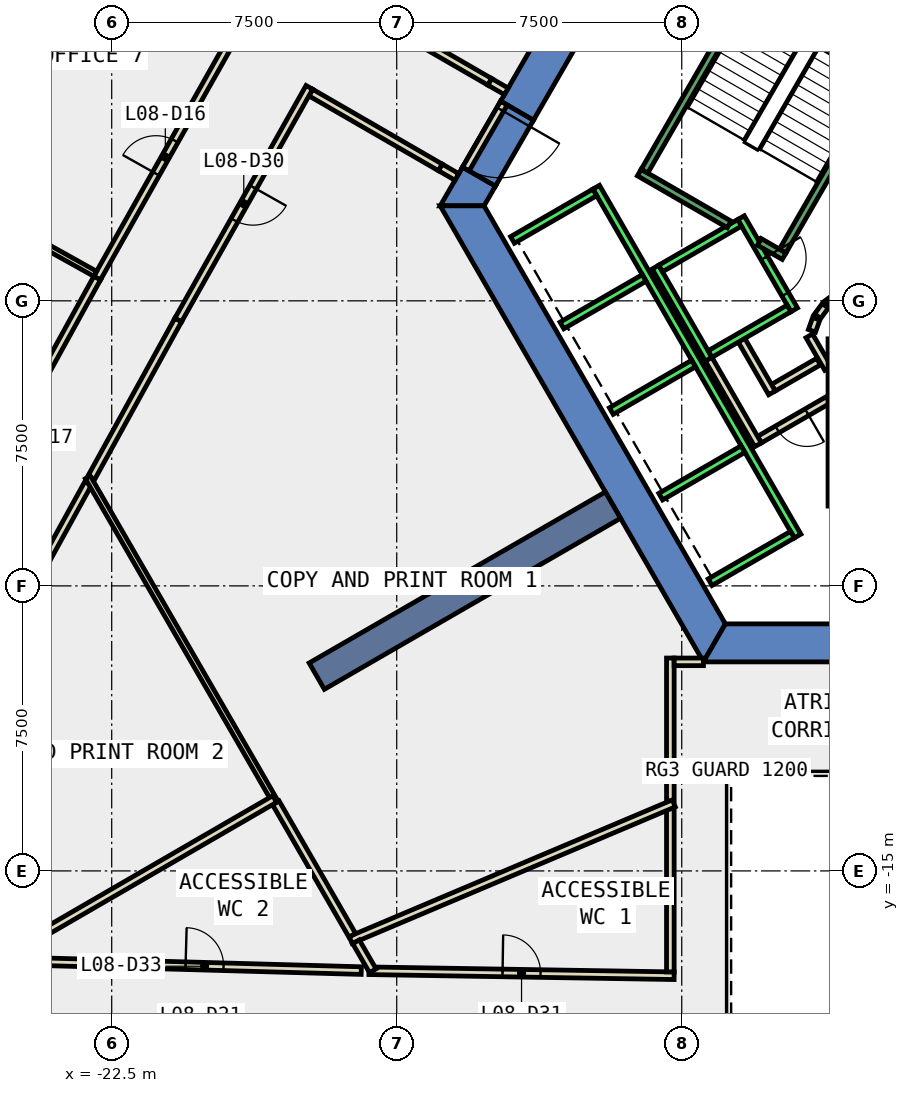
"""IFC4 building model, lengths in metres.
Left out: names, types, materials, properties, quantities, classifications, styles, units other than length and angle.
Written with IfcOpenShell. Run it as: python <this file> out.ifc"""

import sys

from ifc_helpers import new_model, si_unit, direction, frame, frame_2d, origin, place, context, subcontext, project, spatial, polyline, rectangle, outline, extrude, element, fill, save


model = new_model("IFC4")
c1 = context("Model", 3, precision=1e-05, world=origin(), true_north=direction((0.0, 1.0)))
c2 = subcontext(c1, "Body", "Model", "MODEL_VIEW")
j1 = project(units=[si_unit("LENGTHUNIT", "METRE"), si_unit("PLANEANGLEUNIT", "RADIAN")], contexts=[c1])
p1 = place(None, origin())
s1 = spatial("IfcSite", under=j1, at=p1, CompositionType="ELEMENT")
p2 = place(p1, origin())
s2 = spatial("IfcBuilding", under=s1, at=p2, CompositionType="ELEMENT")
p3 = place(p2, frame((0.0, 0.0, 43.4)))
s3 = spatial("IfcBuildingStorey", under=s2, at=p3, CompositionType="ELEMENT", Elevation=43.4)
p4 = place(p3, frame((0.0, 0.0, -0.4)))
e1 = element("IfcWall", 1, at=p4, inside=s3, PredefinedType="SHEAR", context=c2, shape_type="SweptSolid", body=[
    extrude(outline(polyline([(-12.267, 5.252), (-11.402, 4.752), (-6.351, 13.5), (-6.928, 14.5), (-12.267, 5.252)])), origin(), (0.0, 0.0, 1.0), 4.2),
])
p5 = place(p3, frame((0.0, 0.0, -0.4)))
e2 = element("IfcWall", 2, at=p5, inside=s3, PredefinedType="SHEAR", context=c2, shape_type="SweptSolid", body=[
    extrude(outline(polyline([(-12.402, 3.02), (-13.267, 3.52), (-13.856, 2.5), (-12.702, 2.5), (-12.402, 3.02)])), origin(), (0.0, 0.0, 1.0), 4.2),
])
p6 = place(p3, frame((0.0, 0.0, 3.6)))
e3 = element("IfcWall", 3, at=p6, inside=s3, PredefinedType="SHEAR", context=c2, shape_type="SweptSolid", body=[
    extrude(outline(polyline([(-13.267, 3.52), (-12.402, 3.02), (-11.402, 4.752), (-12.267, 5.252), (-13.267, 3.52)])), origin(), (0.0, 0.0, 1.0), 0.2),
])
p7 = place(p3, frame((0.0, 0.0, -0.4)))
e4 = element("IfcWall", 4, at=p7, inside=s3, PredefinedType="SHEAR", context=c2, shape_type="SweptSolid", body=[
    extrude(outline(polyline([(-13.856, 2.5), (-6.928, -9.5), (-6.351, -8.5), (-12.702, 2.5), (-13.856, 2.5)])), origin(), (0.0, 0.0, 1.0), 4.2),
])
p8 = place(p3, frame((0.0, 0.0, -0.4)))
e5 = element("IfcWall", 5, at=p8, inside=s3, PredefinedType="SHEAR", context=c2, shape_type="SweptSolid", body=[
    extrude(outline(polyline([(3.75, -9.5), (3.75, -8.5), (-6.351, -8.5), (-6.928, -9.5), (3.75, -9.5)])), origin(), (0.0, 0.0, 1.0), 4.2),
])
p9 = place(p3, frame((-9.31, -5.375, -0.4), z_axis=(0.0, 0.0, 1.0), x_axis=(-0.866017533419, -0.500013631625, 0.0)))
e6 = element("IfcWall", 6, at=p9, inside=s3, PredefinedType="SHEAR", context=c2, shape_type="SweptSolid", body=[
    extrude(rectangle(XDim=9.0, YDim=0.8, at=frame_2d((4.5, 0.0))), origin(), (0.0, 0.0, 1.0), 4.2),
])
p10 = place(p3, frame((-15.963, 7.733, 0.0), z_axis=(0.0, 0.0, 1.0), x_axis=(0.865965832374, -0.500103166518, 0.0)))
e7 = element("IfcWall", 7, at=p10, inside=s3, PredefinedType="PARTITIONING", context=c2, shape_type="SweptSolid", body=[
    extrude(rectangle(XDim=3.941, YDim=0.2, at=frame_2d((1.971, 0.0))), origin(), (0.0, 0.0, 1.0), 3.8),
])
p11 = place(p3, frame((-17.261, 5.48, 0.0), z_axis=(0.0, 0.0, 1.0), x_axis=(0.865949187497, -0.500131987253, 0.0)))
e8 = element("IfcWall", 8, at=p11, inside=s3, PredefinedType="PARTITIONING", context=c2, shape_type="SweptSolid", body=[
    extrude(rectangle(XDim=3.939, YDim=0.2, at=frame_2d((1.969, 0.0))), origin(), (0.0, 0.0, 1.0), 3.8),
])
p12 = place(p3, frame((-17.299, 5.617, 0.0), z_axis=(0.0, 0.0, 1.0), x_axis=(-0.491166441632, -0.871065741844, 0.0)))
e9 = element("IfcWall", 9, at=p12, inside=s3, PredefinedType="PARTITIONING", context=c2, shape_type="SweptSolid", body=[
    extrude(rectangle(XDim=7.028, YDim=0.2, at=frame_2d((3.514, 0.0))), origin(), (0.0, 0.0, 1.0), 3.8),
])
p13 = place(p12, frame((3.014, 0.0, 0.0)))
e10 = element("IfcOpeningElement", 10, at=p13, cuts=e9, PredefinedType="OPENING", context=c2, shape_type="SweptSolid", body=[
    extrude(rectangle(XDim=1.0, YDim=2.1, at=frame_2d((0.5, 1.05))), frame((0.0, 0.11, 0.0), z_axis=(0.0, -1.0, 0.0), x_axis=(1.0, 0.0, 0.0)), (0.0, 0.0, 1.0), 0.22),
])
p14 = place(p3, frame((-20.751, -0.505, 0.0), z_axis=(0.0, 0.0, 1.0), x_axis=(-0.482566110981, -0.875859548405, 0.0)))
e11 = element("IfcWall", 11, at=p14, inside=s3, PredefinedType="PARTITIONING", context=c2, shape_type="SweptSolid", body=[
    extrude(rectangle(XDim=4.748, YDim=0.2, at=frame_2d((2.374, 0.0))), origin(), (0.0, 0.0, 1.0), 3.8),
])
p15 = place(p3, frame((-15.73, -17.627, 0.0), z_axis=(0.0, 0.0, 1.0), x_axis=(0.999866746812, -0.016324479129, 0.0)))
e12 = element("IfcWall", 12, at=p15, inside=s3, PredefinedType="PARTITIONING", context=c2, shape_type="SweptSolid", body=[
    extrude(rectangle(XDim=8.031, YDim=0.2, at=frame_2d((4.016, 0.0))), origin(), (0.0, 0.0, 1.0), 3.8),
])
p16 = place(p15, frame((3.515, 0.0, 0.0)))
e13 = element("IfcOpeningElement", 13, at=p16, cuts=e12, PredefinedType="OPENING", context=c2, shape_type="SweptSolid", body=[
    extrude(rectangle(XDim=1.0, YDim=2.1, at=frame_2d((0.5, 1.05))), frame((0.0, 0.11, 0.0), z_axis=(0.0, -1.0, 0.0), x_axis=(1.0, 0.0, 0.0)), (0.0, 0.0, 1.0), 0.22),
])
p17 = place(p3, frame((-23.114, -4.794, 0.0), z_axis=(0.0, 0.0, 1.0), x_axis=(-0.482482362329, -0.875905685586, 0.0)))
e14 = element("IfcWall", 14, at=p17, inside=s3, PredefinedType="PARTITIONING", context=c2, shape_type="SweptSolid", body=[
    extrude(rectangle(XDim=2.311, YDim=0.2, at=frame_2d((1.156, 0.0))), origin(), (0.0, 0.0, 1.0), 3.8),
])
p18 = place(p3, frame((-24.18, -17.393, 0.0), z_axis=(0.0, 0.0, 1.0), x_axis=(0.999611380121, -0.02787631132, 0.0)))
e15 = element("IfcWall", 15, at=p18, inside=s3, PredefinedType="PARTITIONING", context=c2, shape_type="SweptSolid", body=[
    extrude(rectangle(XDim=8.25, YDim=0.2, at=frame_2d((4.125, 0.0))), origin(), (0.0, 0.0, 1.0), 3.8),
])
p19 = place(p18, frame((3.625, 0.0, 0.0)))
e16 = element("IfcOpeningElement", 16, at=p19, cuts=e15, PredefinedType="OPENING", context=c2, shape_type="SweptSolid", body=[
    extrude(rectangle(XDim=1.0, YDim=2.1, at=frame_2d((0.5, 1.05))), frame((0.0, 0.11, 0.0), z_axis=(0.0, -1.0, 0.0), x_axis=(1.0, 0.0, 0.0)), (0.0, 0.0, 1.0), 0.22),
])
p20 = place(p3, frame((-22.884, 0.598, 0.0), z_axis=(0.0, 0.0, 1.0), x_axis=(0.491206176175, 0.871043335597, 0.0)))
e17 = element("IfcWall", 17, at=p20, inside=s3, PredefinedType="PARTITIONING", context=c2, shape_type="SweptSolid", body=[
    extrude(rectangle(XDim=7.309, YDim=0.2, at=frame_2d((3.654, 0.0))), origin(), (0.0, 0.0, 1.0), 3.8),
])
p21 = place(p20, frame((3.154, 0.0, 0.0)))
e18 = element("IfcOpeningElement", 18, at=p21, cuts=e17, PredefinedType="OPENING", context=c2, shape_type="SweptSolid", body=[
    extrude(rectangle(XDim=1.0, YDim=2.1, at=frame_2d((0.5, 1.05))), frame((0.0, 0.11, 0.0), z_axis=(0.0, -1.0, 0.0), x_axis=(1.0, 0.0, 0.0)), (0.0, 0.0, 1.0), 0.22),
])
p22 = place(p3, frame((-26.373, -5.736, 0.0), z_axis=(0.0, 0.0, 1.0), x_axis=(0.482587313112, 0.875847866483, 0.0)))
e19 = element("IfcWall", 19, at=p22, inside=s3, PredefinedType="PARTITIONING", context=c2, shape_type="SweptSolid", body=[
    extrude(rectangle(XDim=7.232, YDim=0.2, at=frame_2d((3.616, 0.0))), origin(), (0.0, 0.0, 1.0), 3.8),
])
p23 = place(p22, frame((3.191, 0.0, 0.0)))
e20 = element("IfcOpeningElement", 20, at=p23, cuts=e19, PredefinedType="OPENING", context=c2, shape_type="SweptSolid", body=[
    extrude(rectangle(XDim=1.0, YDim=2.1, at=frame_2d((0.5, 1.05))), frame((0.0, 0.11, 0.0), z_axis=(0.0, -1.0, 0.0), x_axis=(1.0, 0.0, 0.0)), (0.0, 0.0, 1.0), 0.22),
])
p24 = place(p3, frame((-3.9, -1.599, 0.0), z_axis=(0.0, 0.0, 1.0), x_axis=(-0.865969445389, -0.500096910261, 0.0)))
e21 = element("IfcWall", 21, at=p24, inside=s3, PredefinedType="PARTITIONING", context=c2, shape_type="SweptSolid", body=[
    extrude(rectangle(XDim=1.373, YDim=0.2, at=frame_2d((0.687, 0.0))), origin(), (0.0, 0.0, 1.0), 3.8),
])
p25 = place(p3, frame((-5.126, -2.422, 0.0), z_axis=(0.0, 0.0, 1.0), x_axis=(-0.500062241894, 0.865989465428, 0.0)))
e22 = element("IfcWall", 22, at=p25, inside=s3, PredefinedType="PARTITIONING", context=c2, shape_type="SweptSolid", body=[
    extrude(rectangle(XDim=1.7, YDim=0.2, at=frame_2d((0.85, 0.0))), origin(), (0.0, 0.0, 1.0), 3.8),
])
p26 = place(p3, frame((-3.65, -2.61, 0.0), z_axis=(0.0, 0.0, 1.0), x_axis=(-0.866072462134, -0.499918483688, 0.0)))
e23 = element("IfcWall", 23, at=p26, inside=s3, PredefinedType="PARTITIONING", context=c2, shape_type="SweptSolid", body=[
    extrude(rectangle(XDim=2.084, YDim=0.2, at=frame_2d((1.042, 0.0))), origin(), (0.0, 0.0, 1.0), 3.8),
])
p27 = place(p26, frame((0.642, 0.0, 0.0)))
e24 = element("IfcOpeningElement", 24, at=p27, cuts=e23, PredefinedType="OPENING", context=c2, shape_type="SweptSolid", body=[
    extrude(rectangle(XDim=0.9, YDim=2.1, at=frame_2d((0.45, 1.05))), frame((0.0, 0.11, 0.0), z_axis=(0.0, -1.0, 0.0), x_axis=(1.0, 0.0, 0.0)), (0.0, 0.0, 1.0), 0.22),
])
p28 = place(p3, frame((-5.492, -3.788, 0.0), z_axis=(0.0, 0.0, 1.0), x_axis=(-0.500008949224, 0.866020236886, 0.0)))
e25 = element("IfcWall", 25, at=p28, inside=s3, PredefinedType="PARTITIONING", context=c2, shape_type="SweptSolid", body=[
    extrude(rectangle(XDim=2.68, YDim=0.2, at=frame_2d((1.34, 0.0))), origin(), (0.0, 0.0, 1.0), 3.8),
])
p29 = place(p3, frame((-4.145, -0.92, 0.0), z_axis=(0.0, 0.0, 1.0), x_axis=(0.499743786207, -0.866173278362, 0.0)))
e26 = element("IfcWall", 26, at=p29, inside=s3, PredefinedType="PARTITIONING", context=c2, shape_type="SweptSolid", body=[
    extrude(rectangle(XDim=0.991, YDim=0.2, at=frame_2d((0.495, 0.0))), origin(), (0.0, 0.0, 1.0), 3.8),
])
p30 = place(p3, frame((-3.397, 0.124, 0.0), z_axis=(0.0, 0.0, 1.0), x_axis=(-0.804311165252, -0.594208338422, 0.0)))
e27 = element("IfcWall", 27, at=p30, inside=s3, PredefinedType="PARTITIONING", context=c2, shape_type="SweptSolid", body=[
    extrude(rectangle(XDim=0.338, YDim=0.2, at=frame_2d((0.169, 0.0))), origin(), (0.0, 0.0, 1.0), 3.8),
])
p31 = place(p3, frame((-3.723, -0.131, 0.0), z_axis=(0.0, 0.0, 1.0), x_axis=(-0.594675113454, -0.803966112121, 0.0)))
e28 = element("IfcWall", 28, at=p31, inside=s3, PredefinedType="PARTITIONING", context=c2, shape_type="SweptSolid", body=[
    extrude(rectangle(XDim=0.338, YDim=0.2, at=frame_2d((0.169, 0.0))), origin(), (0.0, 0.0, 1.0), 3.8),
])
p32 = place(p3, frame((-3.96, -0.47, 0.0), z_axis=(0.0, 0.0, 1.0), x_axis=(-0.334824194261, -0.942280615813, 0.0)))
e29 = element("IfcWall", 29, at=p32, inside=s3, PredefinedType="PARTITIONING", context=c2, shape_type="SweptSolid", body=[
    extrude(rectangle(XDim=0.338, YDim=0.2, at=frame_2d((0.169, 0.0))), origin(), (0.0, 0.0, 1.0), 3.8),
])
p33 = place(p3, frame((-7.8, -13.161, 0.0), z_axis=(0.0, 0.0, 1.0), x_axis=(0.0, 1.0, 0.0)))
e30 = element("IfcWall", 30, at=p33, inside=s3, PredefinedType="PARTITIONING", context=c2, shape_type="SweptSolid", body=[
    extrude(rectangle(XDim=3.762, YDim=0.2, at=frame_2d((1.881, 0.0))), origin(), (0.0, 0.0, 1.0), 3.8),
])
p34 = place(p3, frame((-7.7, -9.499, 0.0), z_axis=(0.0, 0.0, 1.0), x_axis=(1.0, 0.0, 0.0)))
e31 = element("IfcWall", 31, at=p34, inside=s3, PredefinedType="PARTITIONING", context=c2, shape_type="SweptSolid", body=[
    extrude(rectangle(XDim=0.771, YDim=0.2, at=frame_2d((0.385, 0.0))), origin(), (0.0, 0.0, 1.0), 3.8),
])
p35 = place(p3, frame((-7.8, -17.657, 0.0), z_axis=(0.0, 0.0, 1.0), x_axis=(0.0, 1.0, 0.0)))
e32 = element("IfcWall", 32, at=p35, inside=s3, PredefinedType="PARTITIONING", context=c2, shape_type="SweptSolid", body=[
    extrude(rectangle(XDim=4.296, YDim=0.2, at=frame_2d((2.148, 0.0))), origin(), (0.0, 0.0, 1.0), 3.8),
])
p36 = place(p3, frame((-7.708, -13.222, 0.0), z_axis=(0.0, 0.0, 1.0), x_axis=(-0.921093468555, -0.389341523839, 0.0)))
e33 = element("IfcWall", 33, at=p36, inside=s3, PredefinedType="PARTITIONING", context=c2, shape_type="SweptSolid", body=[
    extrude(rectangle(XDim=9.233, YDim=0.2, at=frame_2d((4.617, 0.0))), origin(), (0.0, 0.0, 1.0), 3.8),
])
p37 = place(p3, frame((-18.182, -13.207, 0.0), z_axis=(0.0, 0.0, 1.0), x_axis=(-0.500081416649, 0.865978392757, 0.0)))
e34 = element("IfcWall", 34, at=p37, inside=s3, PredefinedType="PARTITIONING", context=c2, shape_type="SweptSolid", body=[
    extrude(rectangle(XDim=9.89, YDim=0.15, at=frame_2d((4.945, 0.0))), origin(), (0.0, 0.0, 1.0), 3.8),
])
p38 = place(p3, frame((-16.171, -16.692, 0.0), z_axis=(0.0, 0.0, 1.0), x_axis=(-0.499813503007, 0.866133051102, 0.0)))
e35 = element("IfcWall", 35, at=p38, inside=s3, PredefinedType="PARTITIONING", context=c2, shape_type="SweptSolid", body=[
    extrude(rectangle(XDim=4.023, YDim=0.2, at=frame_2d((2.012, 0.0))), origin(), (0.0, 0.0, 1.0), 3.8),
])
p39 = place(p3, frame((-15.63, -17.628, 0.0), z_axis=(0.0, 0.0, 1.0), x_axis=(-0.500577563191, 0.865691690632, 0.0)))
e36 = element("IfcWall", 36, at=p39, inside=s3, PredefinedType="PARTITIONING", context=c2, shape_type="SweptSolid", body=[
    extrude(rectangle(XDim=0.881, YDim=0.2, at=frame_2d((0.441, 0.0))), origin(), (0.0, 0.0, 1.0), 3.8),
])
p40 = place(p3, frame((-18.211, -13.108, 0.0), z_axis=(0.0, 0.0, 1.0), x_axis=(-0.865421721769, -0.501044153235, 0.0)))
e37 = element("IfcWall", 37, at=p40, inside=s3, PredefinedType="PARTITIONING", context=c2, shape_type="SweptSolid", body=[
    extrude(rectangle(XDim=8.546, YDim=0.2, at=frame_2d((4.273, 0.0))), origin(), (0.0, 0.0, 1.0), 3.8),
])
p41 = place(p3, frame((-22.935, 0.712, 0.0), z_axis=(0.0, 0.0, 1.0), x_axis=(-0.873395616379, 0.487011393389, 0.0)))
e38 = element("IfcWall", 38, at=p41, inside=s3, PredefinedType="PARTITIONING", context=c2, shape_type="SweptSolid", body=[
    extrude(rectangle(XDim=6.48, YDim=0.15, at=frame_2d((3.24, 0.0))), origin(), (0.0, 0.0, 1.0), 3.8),
])
p42 = place(p3, frame((-12.18, 5.202, 0.0), z_axis=(0.0, 0.0, 1.0), x_axis=(-0.50002537861, -0.866010750942, 0.0)))
e39 = element("IfcWall", 39, at=p42, inside=s3, PredefinedType="PARTITIONING", context=c2, shape_type="SweptSolid", body=[
    extrude(rectangle(XDim=2.0, YDim=0.2, at=frame_2d((1.0, 0.0))), origin(), (0.0, 0.0, 1.0), 2.4),
])
p43 = place(p42, frame((0.19, 0.0, 0.0)))
e40 = element("IfcOpeningElement", 40, at=p43, cuts=e39, PredefinedType="OPENING", context=c2, shape_type="SweptSolid", body=[
    extrude(rectangle(XDim=1.8, YDim=2.1, at=frame_2d((0.9, 1.05))), frame((0.0, 0.11, 0.0), z_axis=(0.0, -1.0, 0.0), x_axis=(1.0, 0.0, 0.0)), (0.0, 0.0, 1.0), 0.22),
])
for number, where, z_axis, x_axis in (
    (41, (-12.55, 5.762, 0.0), (0.0, 0.0, 1.0), (0.866, -0.5, 0.0)),
    (42, (-13.85, 3.51, 0.0), (0.0, 0.0, 1.0), (0.866, -0.5, 0.0)),
):
    element("IfcWall", number, at=place(p3, frame(where, z_axis=z_axis, x_axis=x_axis)), inside=s3, PredefinedType="PARTITIONING", context=c2, shape_type="SweptSolid", body=[
        extrude(rectangle(XDim=0.5, YDim=0.2, at=frame_2d((0.25, 0.0))), origin(), (0.0, 0.0, 1.0), 2.4),
    ])
p44 = place(p3, frame((-5.94, 2.188, 0.0), z_axis=(0.0, 0.0, 1.0), x_axis=(0.49994636267, -0.866056369097, 0.0)))
e43 = element("IfcWall", 43, at=p44, inside=s3, PredefinedType="STANDARD", context=c2, shape_type="SweptSolid", body=[
    extrude(rectangle(XDim=2.8, YDim=0.2, at=frame_2d((1.4, 0.0))), origin(), (0.0, 0.0, 1.0), 3.8),
])
p45 = place(p44, frame((1.225, 0.0, 0.0)))
e44 = element("IfcOpeningElement", 44, at=p45, cuts=e43, PredefinedType="OPENING", context=c2, shape_type="SweptSolid", body=[
    extrude(rectangle(XDim=1.1, YDim=2.1, at=frame_2d((0.55, 1.05))), frame((0.0, 0.11, 0.0), z_axis=(0.0, -1.0, 0.0), x_axis=(1.0, 0.0, 0.0)), (0.0, 0.0, 1.0), 0.22),
])
p46 = place(p3, frame((-8.192, 0.888, 0.0), z_axis=(0.0, 0.0, 1.0), x_axis=(0.49994636267, -0.866056369097, 0.0)))
e45 = element("IfcWall", 45, at=p46, inside=s3, PredefinedType="STANDARD", context=c2, shape_type="SweptSolid", body=[
    extrude(rectangle(XDim=2.8, YDim=0.2, at=frame_2d((1.4, 0.0))), origin(), (0.0, 0.0, 1.0), 3.8),
])
for number, where, z_axis, x_axis in (
    (46, (-5.977, 2.052, 0.0), (0.0, 0.0, 1.0), (-0.866, -0.5, 0.0)),
    (47, (-4.677, -0.2, 0.0), (0.0, 0.0, 1.0), (-0.866, -0.5, 0.0)),
):
    element("IfcWall", number, at=place(p3, frame(where, z_axis=z_axis, x_axis=x_axis)), inside=s3, PredefinedType="STANDARD", context=c2, shape_type="SweptSolid", body=[
        extrude(rectangle(XDim=2.399, YDim=0.2, at=frame_2d((1.2, 0.0))), origin(), (0.0, 0.0, 1.0), 3.8),
    ])
p47 = place(p3, frame((-9.751, 2.99, 0.0), z_axis=(0.0, 0.0, 1.0), x_axis=(0.50000090737, -0.866024879913, 0.0)))
e48 = element("IfcWall", 48, at=p47, inside=s3, PredefinedType="STANDARD", context=c2, shape_type="SweptSolid", body=[
    extrude(rectangle(XDim=10.6, YDim=0.2, at=frame_2d((5.3, 0.0))), origin(), (0.0, 0.0, 1.0), 3.8),
])
p48 = place(p3, frame((-9.788, 2.853, 0.0), z_axis=(0.0, 0.0, 1.0), x_axis=(-0.865998541277, -0.500046524342, 0.0)))
e49 = element("IfcWall", 49, at=p48, inside=s3, PredefinedType="STANDARD", context=c2, shape_type="SweptSolid", body=[
    extrude(rectangle(XDim=2.5, YDim=0.2, at=frame_2d((1.25, 0.0))), origin(), (0.0, 0.0, 1.0), 3.8),
])
for number, where, z_axis, x_axis in (
    (50, (-8.488, 0.602, 0.0), (0.0, 0.0, 1.0), (-0.866, -0.5, 0.0)),
    (51, (-7.188, -1.65, 0.0), (0.0, 0.0, 1.0), (-0.866, -0.5, 0.0)),
    (52, (-5.888, -3.902, 0.0), (0.0, 0.0, 1.0), (-0.866, -0.5, 0.0)),
    (53, (-4.588, -6.153, 0.0), (0.0, 0.0, 1.0), (-0.866, -0.5, 0.0)),
):
    element("IfcWall", number, at=place(p3, frame(where, z_axis=z_axis, x_axis=x_axis)), inside=s3, PredefinedType="STANDARD", context=c2, shape_type="SweptSolid", body=[
        extrude(rectangle(XDim=2.5, YDim=0.2, at=frame_2d((1.25, 0.0))), origin(), (0.0, 0.0, 1.0), 3.8),
    ])
p49 = place(p3, frame((-3.55, -1.0, 0.0), z_axis=(0.0, 0.0, 1.0), x_axis=(0.0, -1.0, 0.0)))
e54 = element("IfcWall", 54, at=p49, inside=s3, PredefinedType="STANDARD", context=c2, shape_type="SweptSolid", body=[
    extrude(rectangle(XDim=4.4, YDim=0.2, at=frame_2d((2.2, 0.0))), origin(), (0.0, 0.0, 1.0), 3.8),
])
p50 = place(p49, frame((1.65, 0.0, 0.0)))
e55 = element("IfcOpeningElement", 55, at=p50, cuts=e54, PredefinedType="OPENING", context=c2, shape_type="SweptSolid", body=[
    extrude(rectangle(XDim=1.1, YDim=2.2, at=frame_2d((0.55, 1.1))), frame((0.0, 0.11, 0.0), z_axis=(0.0, -1.0, 0.0), x_axis=(1.0, 0.0, 0.0)), (0.0, 0.0, 1.0), 0.22),
])
p51 = place(p3, frame((-6.25, 2.01, 0.0), z_axis=(0.0, 0.0, 1.0), x_axis=(-0.86611865017, 0.499838457731, 0.0)))
e56 = element("IfcWall", 56, at=p51, inside=s3, PredefinedType="STANDARD", context=c2, shape_type="SweptSolid", body=[
    extrude(rectangle(XDim=2.733, YDim=0.2, at=frame_2d((1.366, 0.0))), origin(), (0.0, 0.0, 1.0), 3.8),
])
p52 = place(p3, frame((-4.806, 1.176, 0.0), z_axis=(0.0, 0.0, 1.0), x_axis=(-0.866558586415, 0.499075361355, 0.0)))
e57 = element("IfcWall", 57, at=p52, inside=s3, PredefinedType="STANDARD", context=c2, shape_type="SweptSolid", body=[
    extrude(rectangle(XDim=0.751, YDim=0.2, at=frame_2d((0.376, 0.0))), origin(), (0.0, 0.0, 1.0), 3.8),
])
p53 = place(p3, frame((-1.393, 7.288, 0.0), z_axis=(0.0, 0.0, 1.0), x_axis=(-0.499963383562, -0.866046543262, 0.0)))
e58 = element("IfcWall", 58, at=p53, inside=s3, PredefinedType="STANDARD", context=c2, shape_type="SweptSolid", body=[
    extrude(rectangle(XDim=6.9, YDim=0.2, at=frame_2d((3.45, 0.0))), origin(), (0.0, 0.0, 1.0), 3.8),
])
p54 = place(p53, frame((0.45, 0.0, 0.0)))
e59 = element("IfcOpeningElement", 59, at=p54, cuts=e58, PredefinedType="OPENING", context=c2, shape_type="SweptSolid", body=[
    extrude(rectangle(XDim=1.1, YDim=2.2, at=frame_2d((0.55, 1.1))), frame((0.0, 0.11, 0.0), z_axis=(0.0, -1.0, 0.0), x_axis=(1.0, 0.0, 0.0)), (0.0, 0.0, 1.0), 0.22),
])
p55 = place(p3, frame((-5.03, 9.388, 0.0), z_axis=(0.0, 0.0, 1.0), x_axis=(-0.499978703459, -0.866037698999, 0.0)))
e60 = element("IfcWall", 60, at=p55, inside=s3, PredefinedType="STANDARD", context=c2, shape_type="SweptSolid", body=[
    extrude(rectangle(XDim=6.9, YDim=0.2, at=frame_2d((3.45, 0.0))), origin(), (0.0, 0.0, 1.0), 3.8),
])
p56 = place(p21, origin())
e61 = element("IfcDoor", 61, at=p56, inside=s3, OperationType="SINGLE_SWING_RIGHT", PredefinedType="DOOR", context=c2, shape_type="SweptSolid", body=[
    extrude(rectangle(XDim=1.0, YDim=2.1, at=frame_2d((0.5, 1.05))), frame((0.0, 0.025, 0.0), z_axis=(0.0, -1.0, 0.0), x_axis=(1.0, 0.0, 0.0)), (0.0, 0.0, 1.0), 0.05),
])
fill(e18, e61)
p57 = place(p13, origin())
e62 = element("IfcDoor", 62, at=p57, inside=s3, OperationType="SINGLE_SWING_RIGHT", PredefinedType="DOOR", context=c2, shape_type="SweptSolid", body=[
    extrude(rectangle(XDim=1.0, YDim=2.1, at=frame_2d((0.5, 1.05))), frame((0.0, 0.025, 0.0), z_axis=(0.0, -1.0, 0.0), x_axis=(1.0, 0.0, 0.0)), (0.0, 0.0, 1.0), 0.05),
])
fill(e10, e62)
p58 = place(p16, origin())
e63 = element("IfcDoor", 63, at=p58, inside=s3, OperationType="SINGLE_SWING_LEFT", PredefinedType="DOOR", context=c2, shape_type="SweptSolid", body=[
    extrude(rectangle(XDim=1.0, YDim=2.1, at=frame_2d((0.5, 1.05))), frame((0.0, 0.025, 0.0), z_axis=(0.0, -1.0, 0.0), x_axis=(1.0, 0.0, 0.0)), (0.0, 0.0, 1.0), 0.05),
])
fill(e13, e63)
p59 = place(p19, origin())
e64 = element("IfcDoor", 64, at=p59, inside=s3, OperationType="SINGLE_SWING_RIGHT", PredefinedType="DOOR", context=c2, shape_type="SweptSolid", body=[
    extrude(rectangle(XDim=1.0, YDim=2.1, at=frame_2d((0.5, 1.05))), frame((0.0, 0.025, 0.0), z_axis=(0.0, -1.0, 0.0), x_axis=(1.0, 0.0, 0.0)), (0.0, 0.0, 1.0), 0.05),
])
fill(e16, e64)
p60 = place(p27, origin())
e65 = element("IfcDoor", 65, at=p60, inside=s3, OperationType="SINGLE_SWING_LEFT", PredefinedType="DOOR", context=c2, shape_type="SweptSolid", body=[
    extrude(rectangle(XDim=0.9, YDim=2.1, at=frame_2d((0.45, 1.05))), frame((0.0, 0.025, 0.0), z_axis=(0.0, -1.0, 0.0), x_axis=(1.0, 0.0, 0.0)), (0.0, 0.0, 1.0), 0.05),
])
fill(e24, e65)
p61 = place(p43, origin())
e66 = element("IfcDoor", 66, at=p61, inside=s3, OperationType="DOUBLE_DOOR_SINGLE_SWING", PredefinedType="DOOR", context=c2, shape_type="SweptSolid", body=[
    extrude(rectangle(XDim=1.8, YDim=2.1, at=frame_2d((0.9, 1.05))), frame((0.0, 0.025, 0.0), z_axis=(0.0, -1.0, 0.0), x_axis=(1.0, 0.0, 0.0)), (0.0, 0.0, 1.0), 0.05),
])
fill(e40, e66)
p62 = place(p45, origin())
e67 = element("IfcDoor", 67, at=p62, inside=s3, OperationType="SLIDING_TO_LEFT", PredefinedType="DOOR", context=c2, shape_type="SweptSolid", body=[
    extrude(rectangle(XDim=1.1, YDim=2.1, at=frame_2d((0.55, 1.05))), frame((0.0, 0.025, 0.0), z_axis=(0.0, -1.0, 0.0), x_axis=(1.0, 0.0, 0.0)), (0.0, 0.0, 1.0), 0.05),
])
fill(e44, e67)
save(model, sys.argv[1])
